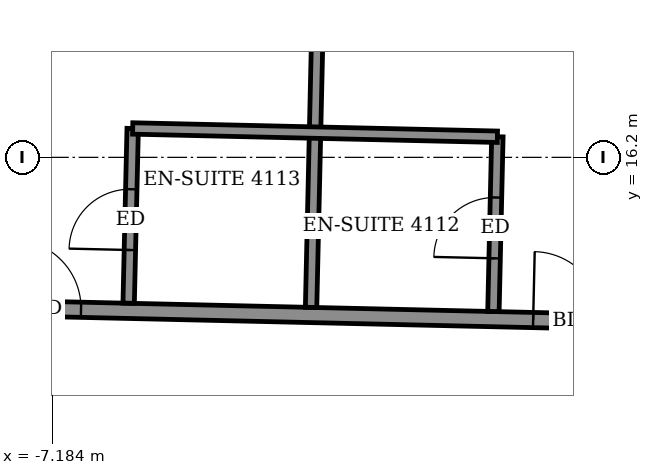
"""IFC4 building model, lengths in metres.
Left out: names, types, materials, properties, quantities, classifications, styles, units other than length and angle.
Written with IfcOpenShell. Run it as: python <this file> out.ifc"""

import sys

from ifc_helpers import new_model, si_unit, direction, frame, frame_2d, origin, place, context, subcontext, project, spatial, rectangle, extrude, element, fill, save


model = new_model("IFC4")
c1 = context("Model", 3, precision=1e-05, world=origin(), true_north=direction((0.0, 1.0)))
c2 = subcontext(c1, "Body", "Model", "MODEL_VIEW")
j1 = project(units=[si_unit("LENGTHUNIT", "METRE"), si_unit("PLANEANGLEUNIT", "RADIAN")], contexts=[c1])
p1 = place(None, origin())
s1 = spatial("IfcSite", under=j1, at=p1, CompositionType="ELEMENT")
p2 = place(p1, origin())
s2 = spatial("IfcBuilding", under=s1, at=p2, CompositionType="ELEMENT")
p3 = place(p2, frame((0.0, 0.0, 163.5)))
s3 = spatial("IfcBuildingStorey", under=s2, at=p3, CompositionType="ELEMENT", Elevation=163.5)
p4 = place(p3, frame((-21.279, 14.523, 0.0), z_axis=(0.0, 0.0, 1.0), x_axis=(0.999742669174, -0.02268469602, 0.0)))
e1 = element("IfcWall", 1, at=p4, inside=s3, PredefinedType="PARTITIONING", context=c2, shape_type="SweptSolid", body=[
    extrude(rectangle(XDim=40.639, YDim=0.2, at=frame_2d((20.319, 0.0))), origin(), (0.0, 0.0, 1.0), 3.05),
])
p5 = place(p4, frame((38.275, 0.0, 0.0)))
e2 = element("IfcOpeningElement", 2, at=p5, cuts=e1, PredefinedType="OPENING", context=c2, shape_type="SweptSolid", body=[
    extrude(rectangle(XDim=0.9, YDim=2.1, at=frame_2d((0.45, 1.05))), frame((0.0, 0.11, 0.0), z_axis=(0.0, -1.0, 0.0), x_axis=(1.0, 0.0, 0.0)), (0.0, 0.0, 1.0), 0.22),
])
p6 = place(p4, frame((31.475, 0.0, 0.0)))
e3 = element("IfcOpeningElement", 3, at=p6, cuts=e1, PredefinedType="OPENING", context=c2, shape_type="SweptSolid", body=[
    extrude(rectangle(XDim=0.9, YDim=2.1, at=frame_2d((0.45, 1.05))), frame((0.0, 0.11, 0.0), z_axis=(0.0, -1.0, 0.0), x_axis=(1.0, 0.0, 0.0)), (0.0, 0.0, 1.0), 0.22),
])
p7 = place(p4, frame((29.35, 0.0, 0.0)))
e4 = element("IfcOpeningElement", 4, at=p7, cuts=e1, PredefinedType="OPENING", context=c2, shape_type="SweptSolid", body=[
    extrude(rectangle(XDim=0.9, YDim=2.1, at=frame_2d((0.45, 1.05))), frame((0.0, 0.11, 0.0), z_axis=(0.0, -1.0, 0.0), x_axis=(1.0, 0.0, 0.0)), (0.0, 0.0, 1.0), 0.22),
])
p8 = place(p4, frame((22.45, 0.0, 0.0)))
e5 = element("IfcOpeningElement", 5, at=p8, cuts=e1, PredefinedType="OPENING", context=c2, shape_type="SweptSolid", body=[
    extrude(rectangle(XDim=0.9, YDim=2.1, at=frame_2d((0.45, 1.05))), frame((0.0, 0.11, 0.0), z_axis=(0.0, -1.0, 0.0), x_axis=(1.0, 0.0, 0.0)), (0.0, 0.0, 1.0), 0.22),
])
p9 = place(p4, frame((20.425, 0.0, 0.0)))
e6 = element("IfcOpeningElement", 6, at=p9, cuts=e1, PredefinedType="OPENING", context=c2, shape_type="SweptSolid", body=[
    extrude(rectangle(XDim=0.9, YDim=2.1, at=frame_2d((0.45, 1.05))), frame((0.0, 0.11, 0.0), z_axis=(0.0, -1.0, 0.0), x_axis=(1.0, 0.0, 0.0)), (0.0, 0.0, 1.0), 0.22),
])
p10 = place(p4, frame((13.575, 0.0, 0.0)))
e7 = element("IfcOpeningElement", 7, at=p10, cuts=e1, PredefinedType="OPENING", context=c2, shape_type="SweptSolid", body=[
    extrude(rectangle(XDim=0.9, YDim=2.1, at=frame_2d((0.45, 1.05))), frame((0.0, 0.11, 0.0), z_axis=(0.0, -1.0, 0.0), x_axis=(1.0, 0.0, 0.0)), (0.0, 0.0, 1.0), 0.22),
])
p11 = place(p4, frame((11.4, 0.0, 0.0)))
e8 = element("IfcOpeningElement", 8, at=p11, cuts=e1, PredefinedType="OPENING", context=c2, shape_type="SweptSolid", body=[
    extrude(rectangle(XDim=0.9, YDim=2.1, at=frame_2d((0.45, 1.05))), frame((0.0, 0.11, 0.0), z_axis=(0.0, -1.0, 0.0), x_axis=(1.0, 0.0, 0.0)), (0.0, 0.0, 1.0), 0.22),
])
p12 = place(p4, frame((1.575, 0.0, 0.0)))
e9 = element("IfcOpeningElement", 9, at=p12, cuts=e1, PredefinedType="OPENING", context=c2, shape_type="SweptSolid", body=[
    extrude(rectangle(XDim=1.0, YDim=2.1, at=frame_2d((0.5, 1.05))), frame((0.0, 0.11, 0.0), z_axis=(0.0, -1.0, 0.0), x_axis=(1.0, 0.0, 0.0)), (0.0, 0.0, 1.0), 0.22),
])
p13 = place(p4, frame((6.6, 0.0, 0.0)))
e10 = element("IfcOpeningElement", 10, at=p13, cuts=e1, PredefinedType="OPENING", context=c2, shape_type="SweptSolid", body=[
    extrude(rectangle(XDim=0.9, YDim=2.1, at=frame_2d((0.45, 1.05))), frame((0.0, 0.11, 0.0), z_axis=(0.0, -1.0, 0.0), x_axis=(1.0, 0.0, 0.0)), (0.0, 0.0, 1.0), 0.22),
])
p14 = place(p3, frame((-6.181, 14.281, 0.0), z_axis=(0.0, 0.0, 1.0), x_axis=(0.023037316498, 0.999734605807, 0.0)))
e11 = element("IfcWall", 11, at=p14, inside=s3, PredefinedType="PARTITIONING", context=c2, shape_type="SweptSolid", body=[
    extrude(rectangle(XDim=2.3, YDim=0.15, at=frame_2d((1.15, 0.0))), origin(), (0.0, 0.0, 1.0), 3.05),
])
p15 = place(p14, frame((0.7, 0.0, 0.0)))
e12 = element("IfcOpeningElement", 12, at=p15, cuts=e11, PredefinedType="OPENING", context=c2, shape_type="SweptSolid", body=[
    extrude(rectangle(XDim=0.8, YDim=2.1, at=frame_2d((0.4, 1.05))), frame((0.0, 0.085, 0.0), z_axis=(0.0, -1.0, 0.0), x_axis=(1.0, 0.0, 0.0)), (0.0, 0.0, 1.0), 0.17),
])
p16 = place(p3, frame((-3.781, 14.226, 0.0), z_axis=(0.0, 0.0, 1.0), x_axis=(0.022688785847, 0.999742576365, 0.0)))
e13 = element("IfcWall", 13, at=p16, inside=s3, PredefinedType="PARTITIONING", context=c2, shape_type="SweptSolid", body=[
    extrude(rectangle(XDim=5.95, YDim=0.15, at=frame_2d((2.975, 0.0))), origin(), (0.0, 0.0, 1.0), 2.55),
])
p17 = place(p3, frame((-1.382, 14.172, 0.0), z_axis=(0.0, 0.0, 1.0), x_axis=(0.022615284993, 0.999744241736, 0.0)))
e14 = element("IfcWall", 14, at=p17, inside=s3, PredefinedType="PARTITIONING", context=c2, shape_type="SweptSolid", body=[
    extrude(rectangle(XDim=2.299, YDim=0.15, at=frame_2d((1.15, 0.0))), origin(), (0.0, 0.0, 1.0), 3.05),
])
p18 = place(p17, frame((0.7, 0.0, 0.0)))
e15 = element("IfcOpeningElement", 15, at=p18, cuts=e14, PredefinedType="OPENING", context=c2, shape_type="SweptSolid", body=[
    extrude(rectangle(XDim=0.8, YDim=2.1, at=frame_2d((0.4, 1.05))), frame((0.0, 0.085, 0.0), z_axis=(0.0, -1.0, 0.0), x_axis=(1.0, 0.0, 0.0)), (0.0, 0.0, 1.0), 0.17),
])
p19 = place(p3, frame((-6.128, 16.58, 0.0), z_axis=(0.0, 0.0, 1.0), x_axis=(0.999741415159, -0.022739894798, 0.0)))
e16 = element("IfcWall", 16, at=p19, inside=s3, PredefinedType="PARTITIONING", context=c2, shape_type="SweptSolid", body=[
    extrude(rectangle(XDim=4.799, YDim=0.15, at=frame_2d((2.399, 0.0))), origin(), (0.0, 0.0, 1.0), 3.05),
])
p20 = place(p9, origin())
e17 = element("IfcDoor", 17, at=p20, inside=s3, OperationType="SINGLE_SWING_RIGHT", PredefinedType="DOOR", context=c2, shape_type="SweptSolid", body=[
    extrude(rectangle(XDim=0.9, YDim=2.1, at=frame_2d((0.45, 1.05))), frame((0.0, 0.025, 0.0), z_axis=(0.0, -1.0, 0.0), x_axis=(1.0, 0.0, 0.0)), (0.0, 0.0, 1.0), 0.05),
])
fill(e6, e17)
p21 = place(p18, origin())
e18 = element("IfcDoor", 18, at=p21, inside=s3, OperationType="SINGLE_SWING_RIGHT", PredefinedType="DOOR", context=c2, shape_type="SweptSolid", body=[
    extrude(rectangle(XDim=0.8, YDim=2.1, at=frame_2d((0.4, 1.05))), frame((0.0, 0.025, 0.0), z_axis=(0.0, -1.0, 0.0), x_axis=(1.0, 0.0, 0.0)), (0.0, 0.0, 1.0), 0.05),
])
fill(e15, e18)
p22 = place(p10, origin())
e19 = element("IfcDoor", 19, at=p22, inside=s3, OperationType="SINGLE_SWING_LEFT", PredefinedType="DOOR", context=c2, shape_type="SweptSolid", body=[
    extrude(rectangle(XDim=0.9, YDim=2.1, at=frame_2d((0.45, 1.05))), frame((0.0, 0.025, 0.0), z_axis=(0.0, -1.0, 0.0), x_axis=(1.0, 0.0, 0.0)), (0.0, 0.0, 1.0), 0.05),
])
fill(e7, e19)
p23 = place(p15, origin())
e20 = element("IfcDoor", 20, at=p23, inside=s3, OperationType="SINGLE_SWING_LEFT", PredefinedType="DOOR", context=c2, shape_type="SweptSolid", body=[
    extrude(rectangle(XDim=0.8, YDim=2.1, at=frame_2d((0.4, 1.05))), frame((0.0, 0.025, 0.0), z_axis=(0.0, -1.0, 0.0), x_axis=(1.0, 0.0, 0.0)), (0.0, 0.0, 1.0), 0.05),
])
fill(e12, e20)
save(model, sys.argv[1])
